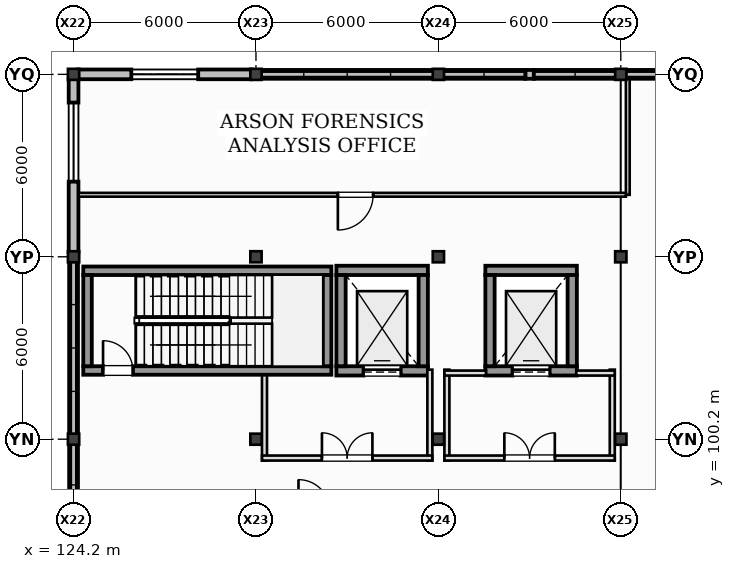
"""IFC4 building model, lengths in metres.
Left out: names, types, materials, properties, quantities, classifications, styles, units other than length and angle.
Written with IfcOpenShell. Run it as: python <this file> out.ifc"""

import sys

from ifc_helpers import new_model, si_unit, direction, frame, frame_2d, origin, origin_2d, place, context, subcontext, project, spatial, rectangle, i_section, extrude, element, fill, save


model = new_model("IFC4")
c1 = context("Model", 3, precision=1e-05, world=origin(), true_north=direction((0.0, 1.0)))
c2 = subcontext(c1, "Body", "Model", "MODEL_VIEW")
j1 = project(units=[si_unit("LENGTHUNIT", "METRE"), si_unit("PLANEANGLEUNIT", "RADIAN")], contexts=[c1])
p1 = place(None, origin())
s1 = spatial("IfcSite", under=j1, at=p1, CompositionType="ELEMENT")
p2 = place(p1, origin())
s2 = spatial("IfcBuilding", under=s1, at=p2, CompositionType="ELEMENT")
p3 = place(p2, frame((0.0, 0.0, 6.0)))
s3 = spatial("IfcBuildingStorey", under=s2, at=p3, CompositionType="ELEMENT", Elevation=6.0)
for number, where, z_axis, x_axis in (
    (1, (124.2, 100.2, 0.0), (0.0, 0.0, 1.0), (1.0, 0.0, 0.0)),
    (2, (124.2, 106.2, 0.0), (0.0, 0.0, 1.0), (1.0, 0.0, 0.0)),
    (3, (124.2, 112.2, 0.0), (0.0, 0.0, 1.0), (1.0, 0.0, 0.0)),
    (4, (130.2, 100.2, 0.0), (0.0, 0.0, 1.0), (1.0, 0.0, 0.0)),
    (5, (130.2, 106.2, 0.0), (0.0, 0.0, 1.0), (1.0, 0.0, 0.0)),
    (6, (130.2, 112.2, 0.0), (0.0, 0.0, 1.0), (1.0, 0.0, 0.0)),
    (7, (136.2, 100.2, 0.0), (0.0, 0.0, 1.0), (1.0, 0.0, 0.0)),
    (8, (136.2, 106.2, 0.0), (0.0, 0.0, 1.0), (1.0, 0.0, 0.0)),
    (9, (136.2, 112.2, 0.0), (0.0, 0.0, 1.0), (1.0, 0.0, 0.0)),
    (10, (142.2, 100.2, 0.0), (0.0, 0.0, 1.0), (1.0, 0.0, 0.0)),
    (11, (142.2, 106.2, 0.0), (0.0, 0.0, 1.0), (1.0, 0.0, 0.0)),
    (12, (142.2, 112.2, 0.0), (0.0, 0.0, 1.0), (1.0, 0.0, 0.0)),
):
    element("IfcColumn", number, at=place(p3, frame(where, z_axis=z_axis, x_axis=x_axis)), inside=s3, PredefinedType="COLUMN", context=c2, shape_type="SweptSolid", body=[
        extrude(i_section(OverallWidth=0.371, OverallDepth=0.364, WebThickness=0.013, FlangeThickness=0.022, at=origin_2d()), origin(), (0.0, 0.0, 1.0), 4.0),
    ])
p4 = place(p3, frame((130.055, 112.2, 0.0), z_axis=(0.0, 0.0, 1.0), x_axis=(-1.0, 0.0, 0.0)))
e13 = element("IfcWall", 13, at=p4, inside=s3, PredefinedType="STANDARD", context=c2, shape_type="SweptSolid", body=[
    extrude(rectangle(XDim=5.71, YDim=0.32, at=frame_2d((2.855, 0.0))), origin(), (0.0, 0.0, 1.0), 3.153),
])
p5 = place(p4, frame((1.755, 0.0, 1.0)))
e14 = element("IfcOpeningElement", 14, at=p5, cuts=e13, PredefinedType="OPENING", context=c2, shape_type="SweptSolid", body=[
    extrude(rectangle(XDim=2.2, YDim=1.36, at=frame_2d((1.1, 0.68))), frame((0.0, 0.17, 0.0), z_axis=(0.0, -1.0, 0.0), x_axis=(1.0, 0.0, 0.0)), (0.0, 0.0, 1.0), 0.34),
])
p6 = place(p3, frame((136.055, 112.2, 0.0), z_axis=(0.0, 0.0, 1.0), x_axis=(-1.0, 0.0, 0.0)))
e15 = element("IfcWall", 15, at=p6, inside=s3, PredefinedType="STANDARD", context=c2, shape_type="SweptSolid", body=[
    extrude(rectangle(XDim=5.71, YDim=0.29, at=frame_2d((2.855, 0.0))), origin(), (0.0, 0.0, 1.0), 0.32),
])
p7 = place(p3, frame((139.34, 112.2, 0.0), z_axis=(0.0, 0.0, 1.0), x_axis=(-1.0, 0.0, 0.0)))
e16 = element("IfcWall", 16, at=p7, inside=s3, PredefinedType="STANDARD", context=c2, shape_type="SweptSolid", body=[
    extrude(rectangle(XDim=0.28, YDim=0.29, at=frame_2d((0.14, 0.0))), origin(), (0.0, 0.0, 1.0), 3.153),
])
p8 = place(p3, frame((142.055, 112.2, 0.0), z_axis=(0.0, 0.0, 1.0), x_axis=(-1.0, 0.0, 0.0)))
e17 = element("IfcWall", 17, at=p8, inside=s3, PredefinedType="STANDARD", context=c2, shape_type="SweptSolid", body=[
    extrude(rectangle(XDim=2.715, YDim=0.29, at=frame_2d((1.357, 0.0))), origin(), (0.0, 0.0, 1.0), 0.44),
])
p9 = place(p3, frame((139.06, 112.2, 0.0), z_axis=(0.0, 0.0, 1.0), x_axis=(-1.0, 0.0, 0.0)))
e18 = element("IfcWall", 18, at=p9, inside=s3, PredefinedType="STANDARD", context=c2, shape_type="SweptSolid", body=[
    extrude(rectangle(XDim=2.715, YDim=0.29, at=frame_2d((1.357, 0.0))), origin(), (0.0, 0.0, 1.0), 0.56),
])
p10 = place(p3, frame((148.055, 112.2, 0.0), z_axis=(0.0, 0.0, 1.0), x_axis=(-1.0, 0.0, 0.0)))
e19 = element("IfcWall", 19, at=p10, inside=s3, PredefinedType="STANDARD", context=c2, shape_type="SweptSolid", body=[
    extrude(rectangle(XDim=5.71, YDim=0.29, at=frame_2d((2.855, 0.0))), origin(), (0.0, 0.0, 1.0), 0.68),
])
p11 = place(p3, frame((124.2, 100.055, 0.0), z_axis=(0.0, 0.0, 1.0), x_axis=(0.0, -1.0, 0.0)))
e20 = element("IfcWall", 20, at=p11, inside=s3, PredefinedType="STANDARD", context=c2, shape_type="SweptSolid", body=[
    extrude(rectangle(XDim=2.715, YDim=0.29, at=frame_2d((1.357, 0.0))), origin(), (0.0, 0.0, 1.0), 0.68),
])
p12 = place(p3, frame((124.2, 106.055, 0.0), z_axis=(0.0, 0.0, 1.0), x_axis=(0.0, -1.0, 0.0)))
e21 = element("IfcWall", 21, at=p12, inside=s3, PredefinedType="STANDARD", context=c2, shape_type="SweptSolid", body=[
    extrude(rectangle(XDim=5.71, YDim=0.29, at=frame_2d((2.855, 0.0))), origin(), (0.0, 0.0, 1.0), 0.92),
])
p13 = place(p3, frame((124.2, 112.055, 0.0), z_axis=(0.0, 0.0, 1.0), x_axis=(0.0, -1.0, 0.0)))
e22 = element("IfcWall", 22, at=p13, inside=s3, PredefinedType="STANDARD", context=c2, shape_type="SweptSolid", body=[
    extrude(rectangle(XDim=5.71, YDim=0.32, at=frame_2d((2.855, 0.0))), origin(), (0.0, 0.0, 1.0), 3.157),
])
p14 = place(p13, frame((0.784, 0.0, 1.0)))
e23 = element("IfcOpeningElement", 23, at=p14, cuts=e22, PredefinedType="OPENING", context=c2, shape_type="SweptSolid", body=[
    extrude(rectangle(XDim=2.6, YDim=1.36, at=frame_2d((1.3, 0.68))), frame((0.0, 0.17, 0.0), z_axis=(0.0, -1.0, 0.0), x_axis=(1.0, 0.0, 0.0)), (0.0, 0.0, 1.0), 0.34),
])
p15 = place(p3, frame((124.52, 102.46, 0.0), z_axis=(0.0, 0.0, 1.0), x_axis=(1.0, 0.0, 0.0)))
e24 = element("IfcWall", 24, at=p15, inside=s3, PredefinedType="SHEAR", context=c2, shape_type="SweptSolid", body=[
    extrude(rectangle(XDim=8.16, YDim=0.28, at=frame_2d((4.08, 0.0))), origin(), (0.0, 0.0, 1.0), 4.0),
])
p16 = place(p15, frame((0.65, 0.0, 0.0)))
e25 = element("IfcOpeningElement", 25, at=p16, cuts=e24, PredefinedType="OPENING", context=c2, shape_type="SweptSolid", body=[
    extrude(rectangle(XDim=0.98, YDim=2.15, at=frame_2d((0.49, 1.075))), frame((0.0, 0.15, 0.0), z_axis=(0.0, -1.0, 0.0), x_axis=(1.0, 0.0, 0.0)), (0.0, 0.0, 1.0), 0.3),
])
p17 = place(p3, frame((132.68, 105.74, 0.0), z_axis=(0.0, 0.0, 1.0), x_axis=(-1.0, 0.0, 0.0)))
e26 = element("IfcWall", 26, at=p17, inside=s3, PredefinedType="SHEAR", context=c2, shape_type="SweptSolid", body=[
    extrude(rectangle(XDim=8.16, YDim=0.28, at=frame_2d((4.08, 0.0))), origin(), (0.0, 0.0, 1.0), 4.0),
])
for number, where, z_axis, x_axis in (
    (27, (124.66, 105.6, 0.0), (0.0, 0.0, 1.0), (0.0, -1.0, 0.0)),
    (28, (132.54, 102.6, 0.0), (0.0, 0.0, 1.0), (0.0, 1.0, 0.0)),
):
    element("IfcWall", number, at=place(p3, frame(where, z_axis=z_axis, x_axis=x_axis)), inside=s3, PredefinedType="SHEAR", context=c2, shape_type="SweptSolid", body=[
        extrude(rectangle(XDim=3.0, YDim=0.28, at=frame_2d((1.5, 0.0))), origin(), (0.0, 0.0, 1.0), 4.0),
    ])
p18 = place(p3, frame((132.845, 102.448, 0.0), z_axis=(0.0, 0.0, 1.0), x_axis=(1.0, 0.0, 0.0)))
e29 = element("IfcWall", 29, at=p18, inside=s3, PredefinedType="SHEAR", context=c2, shape_type="SweptSolid", body=[
    extrude(rectangle(XDim=3.01, YDim=0.305, at=frame_2d((1.505, 0.0))), origin(), (0.0, 0.0, 1.0), 4.0),
])
p19 = place(p18, frame((0.895, 0.0, 0.0)))
e30 = element("IfcOpeningElement", 30, at=p19, cuts=e29, PredefinedType="OPENING", context=c2, shape_type="SweptSolid", body=[
    extrude(rectangle(XDim=1.22, YDim=2.22, at=frame_2d((0.61, 1.11))), frame((0.0, 0.162, 0.0), z_axis=(0.0, -1.0, 0.0), x_axis=(1.0, 0.0, 0.0)), (0.0, 0.0, 1.0), 0.325),
])
p20 = place(p3, frame((135.855, 105.752, 0.0), z_axis=(0.0, 0.0, 1.0), x_axis=(-1.0, 0.0, 0.0)))
e31 = element("IfcWall", 31, at=p20, inside=s3, PredefinedType="SHEAR", context=c2, shape_type="SweptSolid", body=[
    extrude(rectangle(XDim=3.01, YDim=0.305, at=frame_2d((1.505, 0.0))), origin(), (0.0, 0.0, 1.0), 4.0),
])
for number, where, z_axis, x_axis in (
    (32, (132.998, 105.6, 0.0), (0.0, 0.0, 1.0), (0.0, -1.0, 0.0)),
    (33, (135.702, 102.6, 0.0), (0.0, 0.0, 1.0), (0.0, 1.0, 0.0)),
):
    element("IfcWall", number, at=place(p3, frame(where, z_axis=z_axis, x_axis=x_axis)), inside=s3, PredefinedType="SHEAR", context=c2, shape_type="SweptSolid", body=[
        extrude(rectangle(XDim=3.0, YDim=0.305, at=frame_2d((1.5, 0.0))), origin(), (0.0, 0.0, 1.0), 4.0),
    ])
for number, where, z_axis, x_axis in (
    (34, (130.48, 99.5, 0.0), (0.0, 0.0, 1.0), (0.0, 1.0, 0.0)),
    (35, (135.92, 102.488, 0.0), (0.0, 0.0, 1.0), (0.0, -1.0, 0.0)),
):
    element("IfcWall", number, at=place(p3, frame(where, z_axis=z_axis, x_axis=x_axis)), inside=s3, PredefinedType="PARTITIONING", context=c2, shape_type="SweptSolid", body=[
        extrude(rectangle(XDim=2.988, YDim=0.165, at=frame_2d((1.494, 0.0))), origin(), (0.0, 0.0, 1.0), 3.157),
    ])
p21 = place(p3, frame((130.4, 99.58, 0.0), z_axis=(0.0, 0.0, 1.0), x_axis=(1.0, 0.0, 0.0)))
e36 = element("IfcWall", 36, at=p21, inside=s3, PredefinedType="PARTITIONING", context=c2, shape_type="SweptSolid", body=[
    extrude(rectangle(XDim=5.6, YDim=0.165, at=frame_2d((2.8, 0.0))), origin(), (0.0, 0.0, 1.0), 3.72),
])
p22 = place(p21, frame((1.97, 0.0, 0.0)))
e37 = element("IfcOpeningElement", 37, at=p22, cuts=e36, PredefinedType="OPENING", context=c2, shape_type="SweptSolid", body=[
    extrude(rectangle(XDim=1.66, YDim=2.2, at=frame_2d((0.83, 1.1))), frame((0.0, 0.093, 0.0), z_axis=(0.0, -1.0, 0.0), x_axis=(1.0, 0.0, 0.0)), (0.0, 0.0, 1.0), 0.185),
])
p23 = place(p3, frame((137.745, 102.448, 0.0), z_axis=(0.0, 0.0, 1.0), x_axis=(1.0, 0.0, 0.0)))
e38 = element("IfcWall", 38, at=p23, inside=s3, PredefinedType="SHEAR", context=c2, shape_type="SweptSolid", body=[
    extrude(rectangle(XDim=3.01, YDim=0.305, at=frame_2d((1.505, 0.0))), origin(), (0.0, 0.0, 1.0), 4.0),
])
p24 = place(p23, frame((0.895, 0.0, 0.0)))
e39 = element("IfcOpeningElement", 39, at=p24, cuts=e38, PredefinedType="OPENING", context=c2, shape_type="SweptSolid", body=[
    extrude(rectangle(XDim=1.22, YDim=2.22, at=frame_2d((0.61, 1.11))), frame((0.0, 0.162, 0.0), z_axis=(0.0, -1.0, 0.0), x_axis=(1.0, 0.0, 0.0)), (0.0, 0.0, 1.0), 0.325),
])
p25 = place(p3, frame((140.755, 105.752, 0.0), z_axis=(0.0, 0.0, 1.0), x_axis=(-1.0, 0.0, 0.0)))
e40 = element("IfcWall", 40, at=p25, inside=s3, PredefinedType="SHEAR", context=c2, shape_type="SweptSolid", body=[
    extrude(rectangle(XDim=3.01, YDim=0.305, at=frame_2d((1.505, 0.0))), origin(), (0.0, 0.0, 1.0), 4.0),
])
for number, where, z_axis, x_axis in (
    (41, (137.897, 105.6, 0.0), (0.0, 0.0, 1.0), (0.0, -1.0, 0.0)),
    (42, (140.603, 102.6, 0.0), (0.0, 0.0, 1.0), (0.0, 1.0, 0.0)),
):
    element("IfcWall", number, at=place(p3, frame(where, z_axis=z_axis, x_axis=x_axis)), inside=s3, PredefinedType="SHEAR", context=c2, shape_type="SweptSolid", body=[
        extrude(rectangle(XDim=3.0, YDim=0.305, at=frame_2d((1.5, 0.0))), origin(), (0.0, 0.0, 1.0), 4.0),
    ])
for number, where, z_axis, x_axis in (
    (43, (136.48, 99.5, 0.0), (0.0, 0.0, 1.0), (0.0, 1.0, 0.0)),
    (44, (141.92, 102.488, 0.0), (0.0, 0.0, 1.0), (0.0, -1.0, 0.0)),
):
    element("IfcWall", number, at=place(p3, frame(where, z_axis=z_axis, x_axis=x_axis)), inside=s3, PredefinedType="PARTITIONING", context=c2, shape_type="SweptSolid", body=[
        extrude(rectangle(XDim=2.988, YDim=0.165, at=frame_2d((1.494, 0.0))), origin(), (0.0, 0.0, 1.0), 3.157),
    ])
p26 = place(p3, frame((136.4, 102.375, 0.0), z_axis=(0.0, 0.0, 1.0), x_axis=(1.0, 0.0, 0.0)))
e45 = element("IfcWall", 45, at=p26, inside=s3, PredefinedType="PARTITIONING", context=c2, shape_type="SweptSolid", body=[
    extrude(rectangle(XDim=1.365, YDim=0.165, at=frame_2d((0.683, 0.0))), origin(), (0.0, 0.0, 1.0), 3.72),
])
p27 = place(p3, frame((140.735, 102.375, 0.0), z_axis=(0.0, 0.0, 1.0), x_axis=(1.0, 0.0, 0.0)))
e46 = element("IfcWall", 46, at=p27, inside=s3, PredefinedType="PARTITIONING", context=c2, shape_type="SweptSolid", body=[
    extrude(rectangle(XDim=1.265, YDim=0.165, at=frame_2d((0.632, 0.0))), origin(), (0.0, 0.0, 1.0), 3.72),
])
p28 = place(p3, frame((136.4, 99.58, 0.0), z_axis=(0.0, 0.0, 1.0), x_axis=(1.0, 0.0, 0.0)))
e47 = element("IfcWall", 47, at=p28, inside=s3, PredefinedType="PARTITIONING", context=c2, shape_type="SweptSolid", body=[
    extrude(rectangle(XDim=5.6, YDim=0.165, at=frame_2d((2.8, 0.0))), origin(), (0.0, 0.0, 1.0), 3.72),
])
p29 = place(p28, frame((1.97, 0.0, 0.0)))
e48 = element("IfcOpeningElement", 48, at=p29, cuts=e47, PredefinedType="OPENING", context=c2, shape_type="SweptSolid", body=[
    extrude(rectangle(XDim=1.66, YDim=2.2, at=frame_2d((0.83, 1.1))), frame((0.0, 0.093, 0.0), z_axis=(0.0, -1.0, 0.0), x_axis=(1.0, 0.0, 0.0)), (0.0, 0.0, 1.0), 0.185),
])
p30 = place(p3, frame((142.43, 112.055, 0.0), z_axis=(0.0, 0.0, 1.0), x_axis=(0.0, -1.0, 0.0)))
e49 = element("IfcWall", 49, at=p30, inside=s3, PredefinedType="PARTITIONING", context=c2, shape_type="SweptSolid", body=[
    extrude(rectangle(XDim=3.817, YDim=0.125, at=frame_2d((1.909, 0.0))), origin(), (0.0, 0.0, 1.0), 3.157),
])
p31 = place(p3, frame((142.367, 108.24, 0.0), z_axis=(0.0, 0.0, 1.0), x_axis=(-1.0, 0.0, 0.0)))
e50 = element("IfcWall", 50, at=p31, inside=s3, PredefinedType="PARTITIONING", context=c2, shape_type="SweptSolid", body=[
    extrude(rectangle(XDim=18.007, YDim=0.125, at=frame_2d((9.004, 0.0))), origin(), (0.0, 0.0, 1.0), 3.72),
])
p32 = place(p31, frame((8.314, 0.0, 0.0)))
e51 = element("IfcOpeningElement", 51, at=p32, cuts=e50, PredefinedType="OPENING", context=c2, shape_type="SweptSolid", body=[
    extrude(rectangle(XDim=1.16, YDim=2.2, at=frame_2d((0.58, 1.1))), frame((0.0, 0.073, 0.0), z_axis=(0.0, -1.0, 0.0), x_axis=(1.0, 0.0, 0.0)), (0.0, 0.0, 1.0), 0.145),
])
p33 = place(p5, origin())
e52 = element("IfcWindow", 52, at=p33, inside=s3, PartitioningType="SINGLE_PANEL", PredefinedType="WINDOW", context=c2, shape_type="SweptSolid", body=[
    extrude(rectangle(XDim=2.2, YDim=1.36, at=frame_2d((1.1, 0.68))), frame((0.0, 0.03, 0.0), z_axis=(0.0, -1.0, 0.0), x_axis=(1.0, 0.0, 0.0)), (0.0, 0.0, 1.0), 0.06),
])
fill(e14, e52)
p34 = place(p14, origin())
e53 = element("IfcWindow", 53, at=p34, inside=s3, PartitioningType="SINGLE_PANEL", PredefinedType="WINDOW", context=c2, shape_type="SweptSolid", body=[
    extrude(rectangle(XDim=2.6, YDim=1.36, at=frame_2d((1.3, 0.68))), frame((0.0, 0.03, 0.0), z_axis=(0.0, -1.0, 0.0), x_axis=(1.0, 0.0, 0.0)), (0.0, 0.0, 1.0), 0.06),
])
fill(e23, e53)
p35 = place(p16, origin())
e54 = element("IfcDoor", 54, at=p35, inside=s3, OperationType="SINGLE_SWING_LEFT", PredefinedType="DOOR", context=c2, shape_type="SweptSolid", body=[
    extrude(rectangle(XDim=0.98, YDim=2.15, at=frame_2d((0.49, 1.075))), frame((0.0, 0.025, 0.0), z_axis=(0.0, -1.0, 0.0), x_axis=(1.0, 0.0, 0.0)), (0.0, 0.0, 1.0), 0.05),
])
fill(e25, e54)
p36 = place(p19, origin())
e55 = element("IfcDoor", 55, at=p36, inside=s3, OperationType="SLIDING_TO_LEFT", PredefinedType="DOOR", context=c2, shape_type="SweptSolid", body=[
    extrude(rectangle(XDim=1.22, YDim=2.22, at=frame_2d((0.61, 1.11))), frame((0.0, 0.025, 0.0), z_axis=(0.0, -1.0, 0.0), x_axis=(1.0, 0.0, 0.0)), (0.0, 0.0, 1.0), 0.05),
])
fill(e30, e55)
p37 = place(p22, frame((1.66, 0.0, 0.0), z_axis=(0.0, 0.0, 1.0), x_axis=(-1.0, 0.0, 0.0)))
e56 = element("IfcDoor", 56, at=p37, inside=s3, OperationType="DOUBLE_DOOR_SINGLE_SWING", PredefinedType="DOOR", context=c2, shape_type="SweptSolid", body=[
    extrude(rectangle(XDim=1.66, YDim=2.2, at=frame_2d((0.83, 1.1))), frame((0.0, 0.025, 0.0), z_axis=(0.0, -1.0, 0.0), x_axis=(1.0, 0.0, 0.0)), (0.0, 0.0, 1.0), 0.05),
])
fill(e37, e56)
p38 = place(p24, origin())
e57 = element("IfcDoor", 57, at=p38, inside=s3, OperationType="SLIDING_TO_LEFT", PredefinedType="DOOR", context=c2, shape_type="SweptSolid", body=[
    extrude(rectangle(XDim=1.22, YDim=2.22, at=frame_2d((0.61, 1.11))), frame((0.0, 0.025, 0.0), z_axis=(0.0, -1.0, 0.0), x_axis=(1.0, 0.0, 0.0)), (0.0, 0.0, 1.0), 0.05),
])
fill(e39, e57)
p39 = place(p29, frame((1.66, 0.0, 0.0), z_axis=(0.0, 0.0, 1.0), x_axis=(-1.0, 0.0, 0.0)))
e58 = element("IfcDoor", 58, at=p39, inside=s3, OperationType="DOUBLE_DOOR_SINGLE_SWING", PredefinedType="DOOR", context=c2, shape_type="SweptSolid", body=[
    extrude(rectangle(XDim=1.66, YDim=2.2, at=frame_2d((0.83, 1.1))), frame((0.0, 0.025, 0.0), z_axis=(0.0, -1.0, 0.0), x_axis=(1.0, 0.0, 0.0)), (0.0, 0.0, 1.0), 0.05),
])
fill(e48, e58)
p40 = place(p32, frame((1.16, 0.0, 0.0), z_axis=(0.0, 0.0, 1.0), x_axis=(-1.0, 0.0, 0.0)))
e59 = element("IfcDoor", 59, at=p40, inside=s3, OperationType="SINGLE_SWING_RIGHT", PredefinedType="DOOR", context=c2, shape_type="SweptSolid", body=[
    extrude(rectangle(XDim=1.16, YDim=2.2, at=frame_2d((0.58, 1.1))), frame((0.0, 0.025, 0.0), z_axis=(0.0, -1.0, 0.0), x_axis=(1.0, 0.0, 0.0)), (0.0, 0.0, 1.0), 0.05),
])
fill(e51, e59)
save(model, sys.argv[1])
